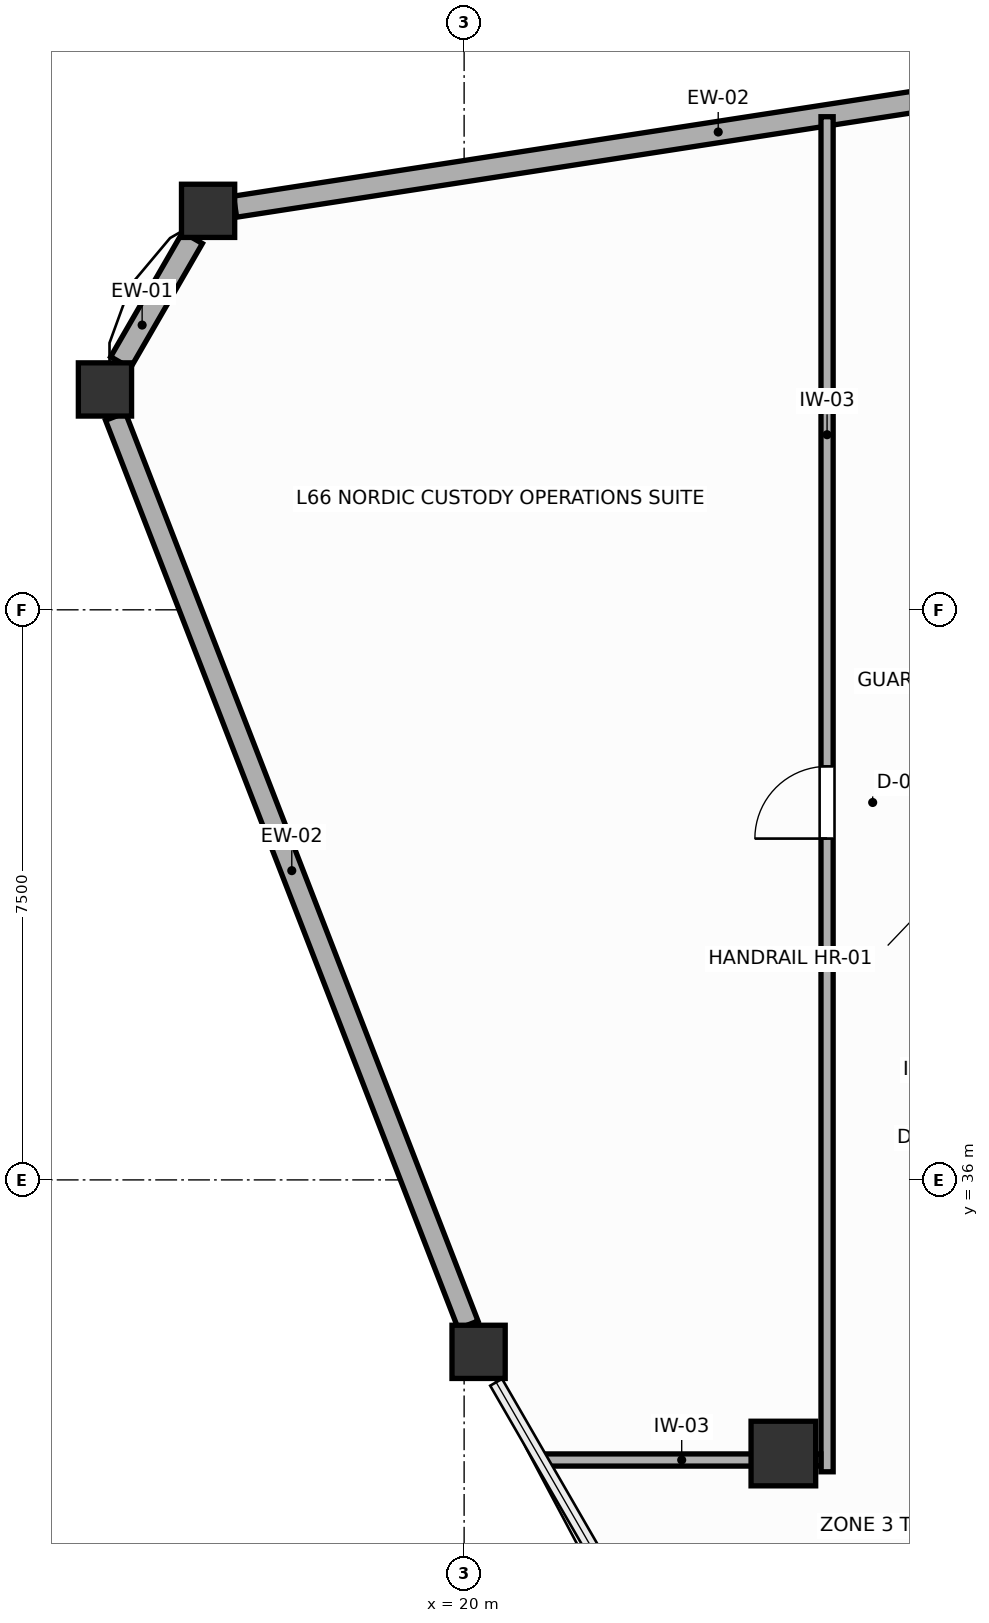
"""IFC4 building model, lengths in metres.
Left out: names, types, materials, properties, quantities, classifications, styles, units other than length and angle.
Written with IfcOpenShell. Run it as: python <this file> out.ifc"""

import sys

from ifc_helpers import new_model, si_unit, direction, frame, frame_2d, origin, origin_2d, place, context, subcontext, project, spatial, rectangle, extrude, source, transform, mapped, element, fill, save


model = new_model("IFC4")
c1 = context("Model", 3, precision=1e-05, world=origin(), true_north=direction((0.0, 1.0)))
c2 = subcontext(c1, "Body", "Model", "MODEL_VIEW")
j1 = project(units=[si_unit("LENGTHUNIT", "METRE"), si_unit("PLANEANGLEUNIT", "RADIAN")], contexts=[c1])
p1 = place(None, origin())
s1 = spatial("IfcSite", under=j1, at=p1, CompositionType="ELEMENT")
p2 = place(p1, origin())
s2 = spatial("IfcBuilding", under=s1, at=p2, CompositionType="ELEMENT")
p3 = place(p2, frame((0.0, 0.0, 253.8)))
s3 = spatial("IfcBuildingStorey", under=s2, at=p3, CompositionType="ELEMENT", Elevation=253.8)
m1 = source(origin(), c2, "Body", "SweptSolid", [
    extrude(rectangle(XDim=0.85, YDim=0.85, at=origin_2d()), origin(), (0.0, 0.0, 1.0), 3.6),
])
p4 = place(p3, frame((24.2, 32.4, 0.0), z_axis=(0.0, 0.0, 1.0), x_axis=(1.0, 0.0, 0.0)))
e1 = element("IfcColumn", 1, at=p4, inside=s3, PredefinedType="COLUMN", context=c2, shape_type="MappedRepresentation", body=[
    mapped(m1, transform((0.0, 0.0, 0.0), scale=1.0)),
])
m2 = source(origin(), c2, "Body", "SweptSolid", [
    extrude(rectangle(XDim=0.7, YDim=0.7, at=origin_2d()), origin(), (0.0, 0.0, 1.0), 3.6),
])
for number, where, z_axis, x_axis in (
    (2, (16.632, 48.749, 0.0), (0.0, 0.0, 1.0), (1.0, 0.0, 0.0)),
    (3, (15.275, 46.399, 0.0), (0.0, 0.0, 1.0), (1.0, 0.0, 0.0)),
    (4, (20.19, 33.738, 0.0), (0.0, 0.0, 1.0), (1.0, 0.0, 0.0)),
):
    element("IfcColumn", number, at=place(p3, frame(where, z_axis=z_axis, x_axis=x_axis)), inside=s3, PredefinedType="COLUMN", context=c2, shape_type="MappedRepresentation", body=[
        mapped(m2, transform((0.0, 0.0, 0.0), scale=1.0)),
    ])
p5 = place(p3, frame((29.699, 50.768, 0.0), z_axis=(0.0, 0.0, 1.0), x_axis=(-0.988274295057, -0.152688957457, 0.0)))
e5 = element("IfcWall", 5, at=p5, inside=s3, PredefinedType="SOLIDWALL", context=c2, shape_type="SweptSolid", body=[
    extrude(rectangle(XDim=12.864, YDim=0.28, at=frame_2d((6.432, 0.0))), origin(), (0.0, 0.0, 1.0), 1.88),
])
p6 = place(p3, frame((16.427, 48.394, 0.0), z_axis=(0.0, 0.0, 1.0), x_axis=(-0.499994028088, -0.866028851642, 0.0)))
e6 = element("IfcWall", 6, at=p6, inside=s3, PredefinedType="SOLIDWALL", context=c2, shape_type="SweptSolid", body=[
    extrude(rectangle(XDim=1.894, YDim=0.3, at=frame_2d((0.947, 0.0))), origin(), (0.0, 0.0, 1.0), 1.88),
])
p7 = place(p3, frame((15.413, 46.044, 0.0), z_axis=(0.0, 0.0, 1.0), x_axis=(0.36191228283, -0.932212153716, 0.0)))
e7 = element("IfcWall", 7, at=p7, inside=s3, PredefinedType="SOLIDWALL", context=c2, shape_type="SweptSolid", body=[
    extrude(rectangle(XDim=12.821, YDim=0.28, at=frame_2d((6.41, 0.0))), origin(), (0.0, 0.0, 1.0), 1.88),
])
p8 = place(p3, frame((24.775, 32.16, 0.0), z_axis=(0.0, 0.0, 1.0), x_axis=(0.0, 1.0, 0.0)))
e8 = element("IfcWall", 8, at=p8, inside=s3, PredefinedType="PARTITIONING", context=c2, shape_type="SweptSolid", body=[
    extrude(rectangle(XDim=17.827, YDim=0.16, at=frame_2d((8.914, 0.0))), origin(), (0.0, 0.0, 1.0), 3.41),
])
p9 = place(p8, frame((8.33, 0.0, 0.0)))
e9 = element("IfcOpeningElement", 9, at=p9, cuts=e8, PredefinedType="OPENING", context=c2, shape_type="SweptSolid", body=[
    extrude(rectangle(XDim=0.95, YDim=2.05, at=frame_2d((0.475, 1.025))), frame((0.0, 0.09, 0.0), z_axis=(0.0, -1.0, 0.0), x_axis=(1.0, 0.0, 0.0)), (0.0, 0.0, 1.0), 0.18),
])
p10 = place(p3, frame((21.032, 32.315, 0.0), z_axis=(0.0, 0.0, 1.0), x_axis=(1.0, 0.0, 0.0)))
e10 = element("IfcWall", 10, at=p10, inside=s3, PredefinedType="PARTITIONING", context=c2, shape_type="SweptSolid", body=[
    extrude(rectangle(XDim=3.661, YDim=0.16, at=frame_2d((1.831, 0.0))), origin(), (0.0, 0.0, 1.0), 2.17),
])
p11 = place(p9, origin())
e11 = element("IfcDoor", 11, at=p11, inside=s3, OperationType="SINGLE_SWING_LEFT", PredefinedType="DOOR", context=c2, shape_type="SweptSolid", body=[
    extrude(rectangle(XDim=0.95, YDim=2.05, at=frame_2d((0.475, 1.025))), frame((0.0, 0.025, 0.0), z_axis=(0.0, -1.0, 0.0), x_axis=(1.0, 0.0, 0.0)), (0.0, 0.0, 1.0), 0.05),
])
fill(e9, e11)
save(model, sys.argv[1])
